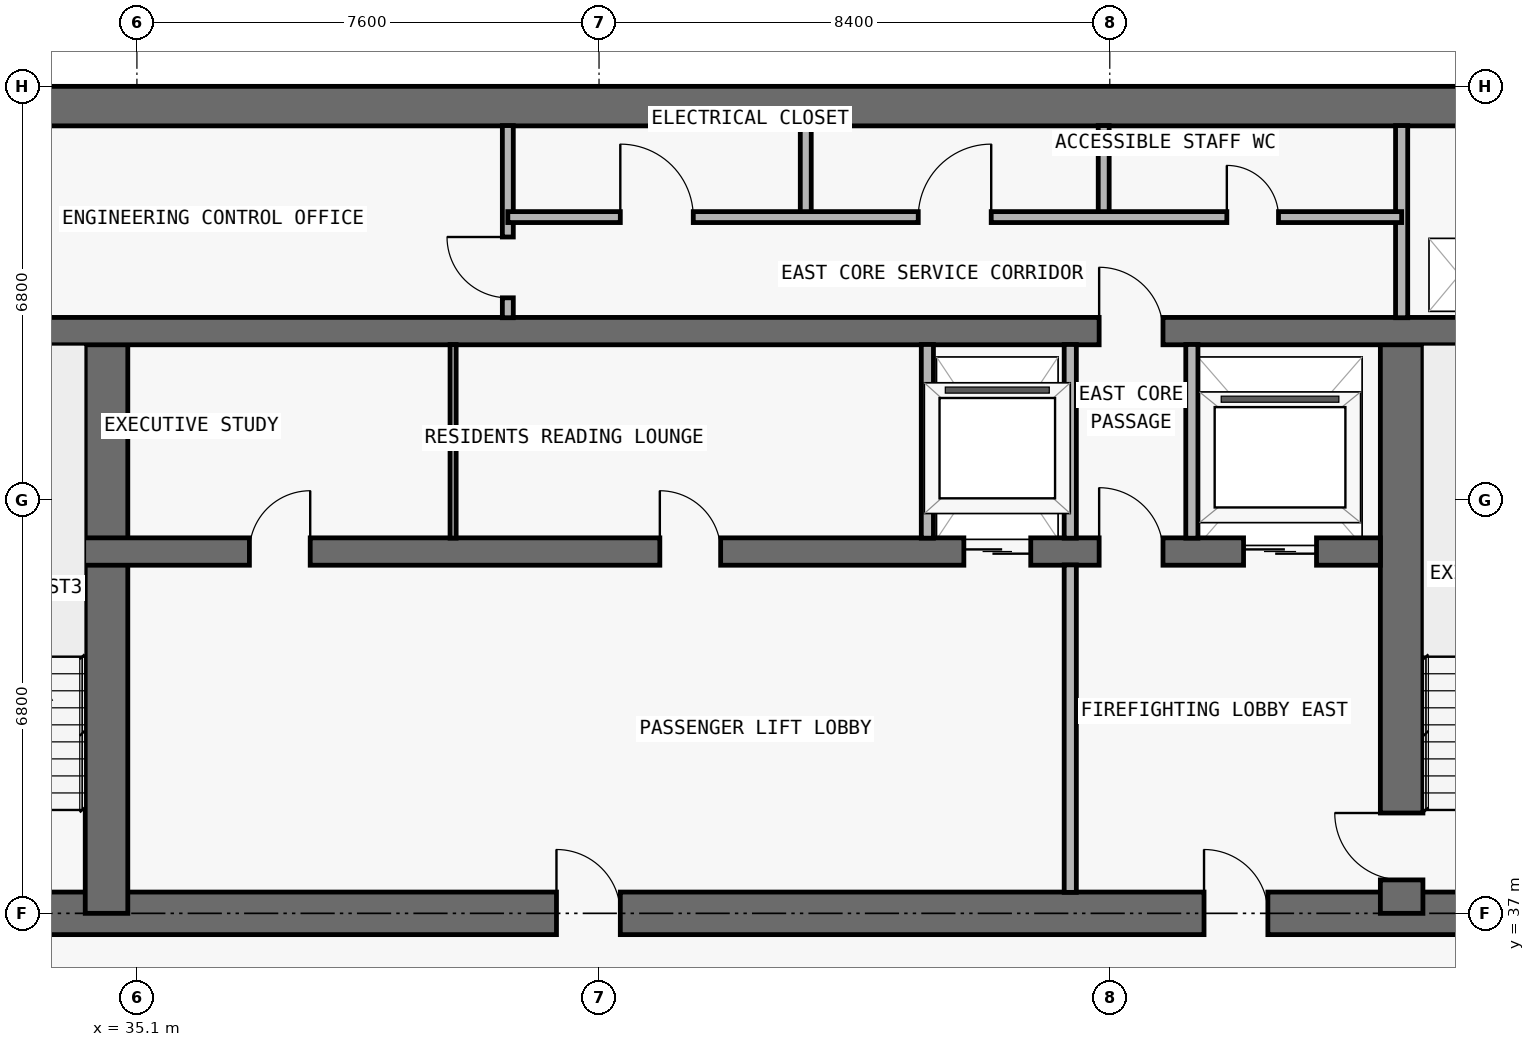
"""IFC4 building model, lengths in metres.
Left out: names, types, materials, properties, quantities, classifications, styles, units other than length and angle.
Written with IfcOpenShell. Run it as: python <this file> out.ifc"""

import sys

from ifc_helpers import new_model, si_unit, direction, frame, frame_2d, origin, place, context, subcontext, project, spatial, rectangle, extrude, element, fill, save


model = new_model("IFC4")
c1 = context("Model", 3, precision=1e-05, world=origin(), true_north=direction((0.0, 1.0)))
c2 = subcontext(c1, "Body", "Model", "MODEL_VIEW")
j1 = project(units=[si_unit("LENGTHUNIT", "METRE"), si_unit("PLANEANGLEUNIT", "RADIAN")], contexts=[c1])
p1 = place(None, origin())
s1 = spatial("IfcSite", under=j1, at=p1, CompositionType="ELEMENT")
p2 = place(p1, origin())
s2 = spatial("IfcBuilding", under=s1, at=p2, CompositionType="ELEMENT")
p3 = place(p2, frame((0.0, 0.0, 243.0)))
s3 = spatial("IfcBuildingStorey", under=s2, at=p3, CompositionType="ELEMENT", Elevation=243.0)
p4 = place(p3, frame((17.95, 37.0, 0.0), z_axis=(0.0, 0.0, 1.0), x_axis=(1.0, 0.0, 0.0)))
e1 = element("IfcWall", 1, at=p4, inside=s3, PredefinedType="SHEAR", context=c2, shape_type="SweptSolid", body=[
    extrude(rectangle(XDim=41.9, YDim=0.7, at=frame_2d((20.95, 0.0))), origin(), (0.0, 0.0, 1.0), 3.05),
])
p5 = place(p4, frame((14.35, 0.0, 0.0)))
e2 = element("IfcOpeningElement", 2, at=p5, cuts=e1, PredefinedType="OPENING", context=c2, shape_type="SweptSolid", body=[
    extrude(rectangle(XDim=1.1, YDim=2.15, at=frame_2d((0.55, 1.075))), frame((0.0, 0.36, 0.0), z_axis=(0.0, -1.0, 0.0), x_axis=(1.0, 0.0, 0.0)), (0.0, 0.0, 1.0), 0.72),
])
p6 = place(p4, frame((6.2, 0.0, 0.0)))
e3 = element("IfcOpeningElement", 3, at=p6, cuts=e1, PredefinedType="OPENING", context=c2, shape_type="SweptSolid", body=[
    extrude(rectangle(XDim=1.05, YDim=2.15, at=frame_2d((0.525, 1.075))), frame((0.0, 0.36, 0.0), z_axis=(0.0, -1.0, 0.0), x_axis=(1.0, 0.0, 0.0)), (0.0, 0.0, 1.0), 0.72),
])
p7 = place(p4, frame((34.7, 0.0, 0.0)))
e4 = element("IfcOpeningElement", 4, at=p7, cuts=e1, PredefinedType="OPENING", context=c2, shape_type="SweptSolid", body=[
    extrude(rectangle(XDim=1.05, YDim=2.15, at=frame_2d((0.525, 1.075))), frame((0.0, 0.36, 0.0), z_axis=(0.0, -1.0, 0.0), x_axis=(1.0, 0.0, 0.0)), (0.0, 0.0, 1.0), 0.72),
])
p8 = place(p4, frame((10.812, 0.0, 0.0)))
e5 = element("IfcOpeningElement", 5, at=p8, cuts=e1, PredefinedType="OPENING", context=c2, shape_type="SweptSolid", body=[
    extrude(rectangle(XDim=1.05, YDim=2.15, at=frame_2d((0.525, 1.075))), frame((0.0, 0.36, 0.0), z_axis=(0.0, -1.0, 0.0), x_axis=(1.0, 0.0, 0.0)), (0.0, 0.0, 1.0), 0.72),
])
p9 = place(p4, frame((24.05, 0.0, 0.0)))
e6 = element("IfcOpeningElement", 6, at=p9, cuts=e1, PredefinedType="OPENING", context=c2, shape_type="SweptSolid", body=[
    extrude(rectangle(XDim=1.05, YDim=2.15, at=frame_2d((0.525, 1.075))), frame((0.0, 0.36, 0.0), z_axis=(0.0, -1.0, 0.0), x_axis=(1.0, 0.0, 0.0)), (0.0, 0.0, 1.0), 0.72),
])
p10 = place(p3, frame((17.95, 50.275, 0.0), z_axis=(0.0, 0.0, 1.0), x_axis=(1.0, 0.0, 0.0)))
e7 = element("IfcWall", 7, at=p10, inside=s3, PredefinedType="SHEAR", context=c2, shape_type="SweptSolid", body=[
    extrude(rectangle(XDim=41.9, YDim=0.65, at=frame_2d((20.95, 0.0))), origin(), (0.0, 0.0, 1.0), 3.05),
])
p11 = place(p3, frame((55.9, 37.0, 0.0), z_axis=(0.0, 0.0, 1.0), x_axis=(0.0, 1.0, 0.0)))
e8 = element("IfcWall", 8, at=p11, inside=s3, PredefinedType="SHEAR", context=c2, shape_type="SweptSolid", body=[
    extrude(rectangle(XDim=9.575, YDim=0.7, at=frame_2d((4.788, 0.0))), origin(), (0.0, 0.0, 1.0), 3.05),
])
p12 = place(p11, frame((0.55, 0.0, 0.0)))
e9 = element("IfcOpeningElement", 9, at=p12, cuts=e8, PredefinedType="OPENING", context=c2, shape_type="SweptSolid", body=[
    extrude(rectangle(XDim=1.1, YDim=2.15, at=frame_2d((0.55, 1.075))), frame((0.0, 0.36, 0.0), z_axis=(0.0, -1.0, 0.0), x_axis=(1.0, 0.0, 0.0)), (0.0, 0.0, 1.0), 0.72),
])
p13 = place(p3, frame((34.6, 37.0, 0.0), z_axis=(0.0, 0.0, 1.0), x_axis=(0.0, 1.0, 0.0)))
e10 = element("IfcWall", 10, at=p13, inside=s3, PredefinedType="SHEAR", context=c2, shape_type="SweptSolid", body=[
    extrude(rectangle(XDim=9.575, YDim=0.7, at=frame_2d((4.788, 0.0))), origin(), (0.0, 0.0, 1.0), 3.05),
])
p14 = place(p3, frame((22.25, 42.95, 0.0), z_axis=(0.0, 0.0, 1.0), x_axis=(1.0, 0.0, 0.0)))
e11 = element("IfcWall", 11, at=p14, inside=s3, PredefinedType="SHEAR", context=c2, shape_type="SweptSolid", body=[
    extrude(rectangle(XDim=33.3, YDim=0.45, at=frame_2d((16.65, 0.0))), origin(), (0.0, 0.0, 1.0), 3.05),
])
p15 = place(p14, frame((1.05, 0.0, 0.0)))
e12 = element("IfcOpeningElement", 12, at=p15, cuts=e11, PredefinedType="OPENING", context=c2, shape_type="SweptSolid", body=[
    extrude(rectangle(XDim=1.2, YDim=2.2, at=frame_2d((0.6, 1.1))), frame((0.0, 0.235, 0.0), z_axis=(0.0, -1.0, 0.0), x_axis=(1.0, 0.0, 0.0)), (0.0, 0.0, 1.0), 0.47),
])
p16 = place(p14, frame((31.05, 0.0, 0.0)))
e13 = element("IfcOpeningElement", 13, at=p16, cuts=e11, PredefinedType="OPENING", context=c2, shape_type="SweptSolid", body=[
    extrude(rectangle(XDim=1.2, YDim=2.2, at=frame_2d((0.6, 1.1))), frame((0.0, 0.235, 0.0), z_axis=(0.0, -1.0, 0.0), x_axis=(1.0, 0.0, 0.0)), (0.0, 0.0, 1.0), 0.47),
])
p17 = place(p14, frame((26.45, 0.0, 0.0)))
e14 = element("IfcOpeningElement", 14, at=p17, cuts=e11, PredefinedType="OPENING", context=c2, shape_type="SweptSolid", body=[
    extrude(rectangle(XDim=1.1, YDim=2.2, at=frame_2d((0.55, 1.1))), frame((0.0, 0.235, 0.0), z_axis=(0.0, -1.0, 0.0), x_axis=(1.0, 0.0, 0.0)), (0.0, 0.0, 1.0), 0.47),
])
p18 = place(p14, frame((5.95, 0.0, 0.0)))
e15 = element("IfcOpeningElement", 15, at=p18, cuts=e11, PredefinedType="OPENING", context=c2, shape_type="SweptSolid", body=[
    extrude(rectangle(XDim=1.1, YDim=2.2, at=frame_2d((0.55, 1.1))), frame((0.0, 0.235, 0.0), z_axis=(0.0, -1.0, 0.0), x_axis=(1.0, 0.0, 0.0)), (0.0, 0.0, 1.0), 0.47),
])
p19 = place(p14, frame((3.625, 0.0, 0.0)))
e16 = element("IfcOpeningElement", 16, at=p19, cuts=e11, PredefinedType="OPENING", context=c2, shape_type="SweptSolid", body=[
    extrude(rectangle(XDim=1.05, YDim=2.15, at=frame_2d((0.525, 1.075))), frame((0.0, 0.235, 0.0), z_axis=(0.0, -1.0, 0.0), x_axis=(1.0, 0.0, 0.0)), (0.0, 0.0, 1.0), 0.47),
])
p20 = place(p14, frame((28.675, 0.0, 0.0)))
e17 = element("IfcOpeningElement", 17, at=p20, cuts=e11, PredefinedType="OPENING", context=c2, shape_type="SweptSolid", body=[
    extrude(rectangle(XDim=1.05, YDim=2.15, at=frame_2d((0.525, 1.075))), frame((0.0, 0.235, 0.0), z_axis=(0.0, -1.0, 0.0), x_axis=(1.0, 0.0, 0.0)), (0.0, 0.0, 1.0), 0.47),
])
p21 = place(p14, frame((14.7, 0.0, 0.0)))
e18 = element("IfcOpeningElement", 18, at=p21, cuts=e11, PredefinedType="OPENING", context=c2, shape_type="SweptSolid", body=[
    extrude(rectangle(XDim=1.0, YDim=2.2, at=frame_2d((0.5, 1.1))), frame((0.0, 0.235, 0.0), z_axis=(0.0, -1.0, 0.0), x_axis=(1.0, 0.0, 0.0)), (0.0, 0.0, 1.0), 0.47),
])
p22 = place(p14, frame((21.45, 0.0, 0.0)))
e19 = element("IfcOpeningElement", 19, at=p22, cuts=e11, PredefinedType="OPENING", context=c2, shape_type="SweptSolid", body=[
    extrude(rectangle(XDim=1.0, YDim=2.2, at=frame_2d((0.5, 1.1))), frame((0.0, 0.235, 0.0), z_axis=(0.0, -1.0, 0.0), x_axis=(1.0, 0.0, 0.0)), (0.0, 0.0, 1.0), 0.47),
])
p23 = place(p3, frame((18.3, 46.575, 0.0), z_axis=(0.0, 0.0, 1.0), x_axis=(1.0, 0.0, 0.0)))
e20 = element("IfcWall", 20, at=p23, inside=s3, PredefinedType="SHEAR", context=c2, shape_type="SweptSolid", body=[
    extrude(rectangle(XDim=41.2, YDim=0.45, at=frame_2d((20.6, 0.0))), origin(), (0.0, 0.0, 1.0), 3.05),
])
p24 = place(p23, frame((7.6, 0.0, 0.0)))
e21 = element("IfcOpeningElement", 21, at=p24, cuts=e20, PredefinedType="OPENING", context=c2, shape_type="SweptSolid", body=[
    extrude(rectangle(XDim=1.0, YDim=2.2, at=frame_2d((0.5, 1.1))), frame((0.0, 0.235, 0.0), z_axis=(0.0, -1.0, 0.0), x_axis=(1.0, 0.0, 0.0)), (0.0, 0.0, 1.0), 0.47),
])
p25 = place(p23, frame((32.625, 0.0, 0.0)))
e22 = element("IfcOpeningElement", 22, at=p25, cuts=e20, PredefinedType="OPENING", context=c2, shape_type="SweptSolid", body=[
    extrude(rectangle(XDim=1.05, YDim=2.15, at=frame_2d((0.525, 1.075))), frame((0.0, 0.235, 0.0), z_axis=(0.0, -1.0, 0.0), x_axis=(1.0, 0.0, 0.0)), (0.0, 0.0, 1.0), 0.47),
])
p26 = place(p3, frame((40.3, 43.17, 0.0), z_axis=(0.0, 0.0, 1.0), x_axis=(0.0, 1.0, 0.0)))
e23 = element("IfcWall", 23, at=p26, inside=s3, PredefinedType="MOVABLE", context=c2, shape_type="SweptSolid", body=[
    extrude(rectangle(XDim=3.185, YDim=0.1, at=frame_2d((1.593, 0.0))), origin(), (0.0, 0.0, 1.0), 3.05),
])
p27 = place(p3, frame((41.2, 46.795, 0.0), z_axis=(0.0, 0.0, 1.0), x_axis=(0.0, 1.0, 0.0)))
e24 = element("IfcWall", 24, at=p27, inside=s3, PredefinedType="PARTITIONING", context=c2, shape_type="SweptSolid", body=[
    extrude(rectangle(XDim=3.16, YDim=0.18, at=frame_2d((1.58, 0.0))), origin(), (0.0, 0.0, 1.0), 3.05),
])
p28 = place(p27, frame((0.327, 0.0, 0.0)))
e25 = element("IfcOpeningElement", 25, at=p28, cuts=e24, PredefinedType="OPENING", context=c2, shape_type="SweptSolid", body=[
    extrude(rectangle(XDim=1.0, YDim=2.2, at=frame_2d((0.5, 1.1))), frame((0.0, 0.1, 0.0), z_axis=(0.0, -1.0, 0.0), x_axis=(1.0, 0.0, 0.0)), (0.0, 0.0, 1.0), 0.2),
])
p29 = place(p3, frame((46.1, 48.45, 0.0), z_axis=(0.0, 0.0, 1.0), x_axis=(0.0, 1.0, 0.0)))
e26 = element("IfcWall", 26, at=p29, inside=s3, PredefinedType="PARTITIONING", context=c2, shape_type="SweptSolid", body=[
    extrude(rectangle(XDim=1.505, YDim=0.18, at=frame_2d((0.752, 0.0))), origin(), (0.0, 0.0, 1.0), 3.05),
])
p30 = place(p3, frame((48.1, 43.17, 0.0), z_axis=(0.0, 0.0, 1.0), x_axis=(0.0, 1.0, 0.0)))
e27 = element("IfcWall", 27, at=p30, inside=s3, PredefinedType="PARTITIONING", context=c2, shape_type="SweptSolid", body=[
    extrude(rectangle(XDim=3.185, YDim=0.2, at=frame_2d((1.593, 0.0))), origin(), (0.0, 0.0, 1.0), 3.05),
])
p31 = place(p3, frame((50.45, 37.345, 0.0), z_axis=(0.0, 0.0, 1.0), x_axis=(0.0, 1.0, 0.0)))
e28 = element("IfcWall", 28, at=p31, inside=s3, PredefinedType="PARTITIONING", context=c2, shape_type="SweptSolid", body=[
    extrude(rectangle(XDim=5.385, YDim=0.2, at=frame_2d((2.692, 0.0))), origin(), (0.0, 0.0, 1.0), 3.05),
])
p32 = place(p3, frame((50.45, 43.17, 0.0), z_axis=(0.0, 0.0, 1.0), x_axis=(0.0, 1.0, 0.0)))
e29 = element("IfcWall", 29, at=p32, inside=s3, PredefinedType="PARTITIONING", context=c2, shape_type="SweptSolid", body=[
    extrude(rectangle(XDim=3.185, YDim=0.2, at=frame_2d((1.593, 0.0))), origin(), (0.0, 0.0, 1.0), 3.05),
])
p33 = place(p3, frame((51.0, 48.45, 0.0), z_axis=(0.0, 0.0, 1.0), x_axis=(0.0, 1.0, 0.0)))
e30 = element("IfcWall", 30, at=p33, inside=s3, PredefinedType="PARTITIONING", context=c2, shape_type="SweptSolid", body=[
    extrude(rectangle(XDim=1.505, YDim=0.18, at=frame_2d((0.752, 0.0))), origin(), (0.0, 0.0, 1.0), 3.05),
])
p34 = place(p3, frame((52.45, 43.17, 0.0), z_axis=(0.0, 0.0, 1.0), x_axis=(0.0, 1.0, 0.0)))
e31 = element("IfcWall", 31, at=p34, inside=s3, PredefinedType="PARTITIONING", context=c2, shape_type="SweptSolid", body=[
    extrude(rectangle(XDim=3.185, YDim=0.2, at=frame_2d((1.593, 0.0))), origin(), (0.0, 0.0, 1.0), 3.05),
])
p35 = place(p3, frame((55.9, 46.795, 0.0), z_axis=(0.0, 0.0, 1.0), x_axis=(0.0, 1.0, 0.0)))
e32 = element("IfcWall", 32, at=p35, inside=s3, PredefinedType="PARTITIONING", context=c2, shape_type="SweptSolid", body=[
    extrude(rectangle(XDim=3.16, YDim=0.2, at=frame_2d((1.58, 0.0))), origin(), (0.0, 0.0, 1.0), 3.05),
])
p36 = place(p3, frame((41.2, 48.45, 0.0), z_axis=(0.0, 0.0, 1.0), x_axis=(1.0, 0.0, 0.0)))
e33 = element("IfcWall", 33, at=p36, inside=s3, PredefinedType="PARTITIONING", context=c2, shape_type="SweptSolid", body=[
    extrude(rectangle(XDim=14.7, YDim=0.18, at=frame_2d((7.35, 0.0))), origin(), (0.0, 0.0, 1.0), 3.05),
])
p37 = place(p36, frame((1.85, 0.0, 0.0)))
e34 = element("IfcOpeningElement", 34, at=p37, cuts=e33, PredefinedType="OPENING", context=c2, shape_type="SweptSolid", body=[
    extrude(rectangle(XDim=1.2, YDim=2.2, at=frame_2d((0.6, 1.1))), frame((0.0, 0.1, 0.0), z_axis=(0.0, -1.0, 0.0), x_axis=(1.0, 0.0, 0.0)), (0.0, 0.0, 1.0), 0.2),
])
p38 = place(p36, frame((6.75, 0.0, 0.0)))
e35 = element("IfcOpeningElement", 35, at=p38, cuts=e33, PredefinedType="OPENING", context=c2, shape_type="SweptSolid", body=[
    extrude(rectangle(XDim=1.2, YDim=2.2, at=frame_2d((0.6, 1.1))), frame((0.0, 0.1, 0.0), z_axis=(0.0, -1.0, 0.0), x_axis=(1.0, 0.0, 0.0)), (0.0, 0.0, 1.0), 0.2),
])
p39 = place(p36, frame((11.825, 0.0, 0.0)))
e36 = element("IfcOpeningElement", 36, at=p39, cuts=e33, PredefinedType="OPENING", context=c2, shape_type="SweptSolid", body=[
    extrude(rectangle(XDim=0.85, YDim=2.1, at=frame_2d((0.425, 1.05))), frame((0.0, 0.1, 0.0), z_axis=(0.0, -1.0, 0.0), x_axis=(1.0, 0.0, 0.0)), (0.0, 0.0, 1.0), 0.2),
])
p40 = place(p16, origin())
e37 = element("IfcDoor", 37, at=p40, inside=s3, OperationType="DOUBLE_DOOR_SLIDING", PredefinedType="DOOR", context=c2, shape_type="SweptSolid", body=[
    extrude(rectangle(XDim=1.2, YDim=2.2, at=frame_2d((0.6, 1.1))), frame((0.0, 0.025, 0.0), z_axis=(0.0, -1.0, 0.0), x_axis=(1.0, 0.0, 0.0)), (0.0, 0.0, 1.0), 0.05),
])
fill(e13, e37)
p41 = place(p17, origin())
e38 = element("IfcDoor", 38, at=p41, inside=s3, OperationType="DOUBLE_DOOR_SLIDING", PredefinedType="DOOR", context=c2, shape_type="SweptSolid", body=[
    extrude(rectangle(XDim=1.1, YDim=2.2, at=frame_2d((0.55, 1.1))), frame((0.0, 0.025, 0.0), z_axis=(0.0, -1.0, 0.0), x_axis=(1.0, 0.0, 0.0)), (0.0, 0.0, 1.0), 0.05),
])
fill(e14, e38)
p42 = place(p7, origin())
e39 = element("IfcDoor", 39, at=p42, inside=s3, OperationType="SINGLE_SWING_LEFT", PredefinedType="DOOR", context=c2, shape_type="SweptSolid", body=[
    extrude(rectangle(XDim=1.05, YDim=2.15, at=frame_2d((0.525, 1.075))), frame((0.0, 0.025, 0.0), z_axis=(0.0, -1.0, 0.0), x_axis=(1.0, 0.0, 0.0)), (0.0, 0.0, 1.0), 0.05),
])
fill(e4, e39)
p43 = place(p12, origin())
e40 = element("IfcDoor", 40, at=p43, inside=s3, OperationType="SINGLE_SWING_RIGHT", PredefinedType="DOOR", context=c2, shape_type="SweptSolid", body=[
    extrude(rectangle(XDim=1.1, YDim=2.15, at=frame_2d((0.55, 1.075))), frame((0.0, 0.025, 0.0), z_axis=(0.0, -1.0, 0.0), x_axis=(1.0, 0.0, 0.0)), (0.0, 0.0, 1.0), 0.05),
])
fill(e9, e40)
p44 = place(p20, origin())
e41 = element("IfcDoor", 41, at=p44, inside=s3, OperationType="SINGLE_SWING_LEFT", PredefinedType="DOOR", context=c2, shape_type="SweptSolid", body=[
    extrude(rectangle(XDim=1.05, YDim=2.15, at=frame_2d((0.525, 1.075))), frame((0.0, 0.025, 0.0), z_axis=(0.0, -1.0, 0.0), x_axis=(1.0, 0.0, 0.0)), (0.0, 0.0, 1.0), 0.05),
])
fill(e17, e41)
p45 = place(p9, origin())
e42 = element("IfcDoor", 42, at=p45, inside=s3, OperationType="SINGLE_SWING_LEFT", PredefinedType="DOOR", context=c2, shape_type="SweptSolid", body=[
    extrude(rectangle(XDim=1.05, YDim=2.15, at=frame_2d((0.525, 1.075))), frame((0.0, 0.025, 0.0), z_axis=(0.0, -1.0, 0.0), x_axis=(1.0, 0.0, 0.0)), (0.0, 0.0, 1.0), 0.05),
])
fill(e6, e42)
p46 = place(p21, origin())
e43 = element("IfcDoor", 43, at=p46, inside=s3, OperationType="SINGLE_SWING_RIGHT", PredefinedType="DOOR", context=c2, shape_type="SweptSolid", body=[
    extrude(rectangle(XDim=1.0, YDim=2.2, at=frame_2d((0.5, 1.1))), frame((0.0, 0.025, 0.0), z_axis=(0.0, -1.0, 0.0), x_axis=(1.0, 0.0, 0.0)), (0.0, 0.0, 1.0), 0.05),
])
fill(e18, e43)
p47 = place(p22, origin())
e44 = element("IfcDoor", 44, at=p47, inside=s3, OperationType="SINGLE_SWING_LEFT", PredefinedType="DOOR", context=c2, shape_type="SweptSolid", body=[
    extrude(rectangle(XDim=1.0, YDim=2.2, at=frame_2d((0.5, 1.1))), frame((0.0, 0.025, 0.0), z_axis=(0.0, -1.0, 0.0), x_axis=(1.0, 0.0, 0.0)), (0.0, 0.0, 1.0), 0.05),
])
fill(e19, e44)
p48 = place(p25, origin())
e45 = element("IfcDoor", 45, at=p48, inside=s3, OperationType="SINGLE_SWING_LEFT", PredefinedType="DOOR", context=c2, shape_type="SweptSolid", body=[
    extrude(rectangle(XDim=1.05, YDim=2.15, at=frame_2d((0.525, 1.075))), frame((0.0, 0.025, 0.0), z_axis=(0.0, -1.0, 0.0), x_axis=(1.0, 0.0, 0.0)), (0.0, 0.0, 1.0), 0.05),
])
fill(e22, e45)
p49 = place(p28, origin())
e46 = element("IfcDoor", 46, at=p49, inside=s3, OperationType="SINGLE_SWING_RIGHT", PredefinedType="DOOR", context=c2, shape_type="SweptSolid", body=[
    extrude(rectangle(XDim=1.0, YDim=2.2, at=frame_2d((0.5, 1.1))), frame((0.0, 0.025, 0.0), z_axis=(0.0, -1.0, 0.0), x_axis=(1.0, 0.0, 0.0)), (0.0, 0.0, 1.0), 0.05),
])
fill(e25, e46)
p50 = place(p37, origin())
e47 = element("IfcDoor", 47, at=p50, inside=s3, OperationType="SINGLE_SWING_LEFT", PredefinedType="DOOR", context=c2, shape_type="SweptSolid", body=[
    extrude(rectangle(XDim=1.2, YDim=2.2, at=frame_2d((0.6, 1.1))), frame((0.0, 0.025, 0.0), z_axis=(0.0, -1.0, 0.0), x_axis=(1.0, 0.0, 0.0)), (0.0, 0.0, 1.0), 0.05),
])
fill(e34, e47)
p51 = place(p38, origin())
e48 = element("IfcDoor", 48, at=p51, inside=s3, OperationType="SINGLE_SWING_RIGHT", PredefinedType="DOOR", context=c2, shape_type="SweptSolid", body=[
    extrude(rectangle(XDim=1.2, YDim=2.2, at=frame_2d((0.6, 1.1))), frame((0.0, 0.025, 0.0), z_axis=(0.0, -1.0, 0.0), x_axis=(1.0, 0.0, 0.0)), (0.0, 0.0, 1.0), 0.05),
])
fill(e35, e48)
p52 = place(p39, origin())
e49 = element("IfcDoor", 49, at=p52, inside=s3, OperationType="SINGLE_SWING_LEFT", PredefinedType="DOOR", context=c2, shape_type="SweptSolid", body=[
    extrude(rectangle(XDim=0.85, YDim=2.1, at=frame_2d((0.425, 1.05))), frame((0.0, 0.025, 0.0), z_axis=(0.0, -1.0, 0.0), x_axis=(1.0, 0.0, 0.0)), (0.0, 0.0, 1.0), 0.05),
])
fill(e36, e49)
save(model, sys.argv[1])
